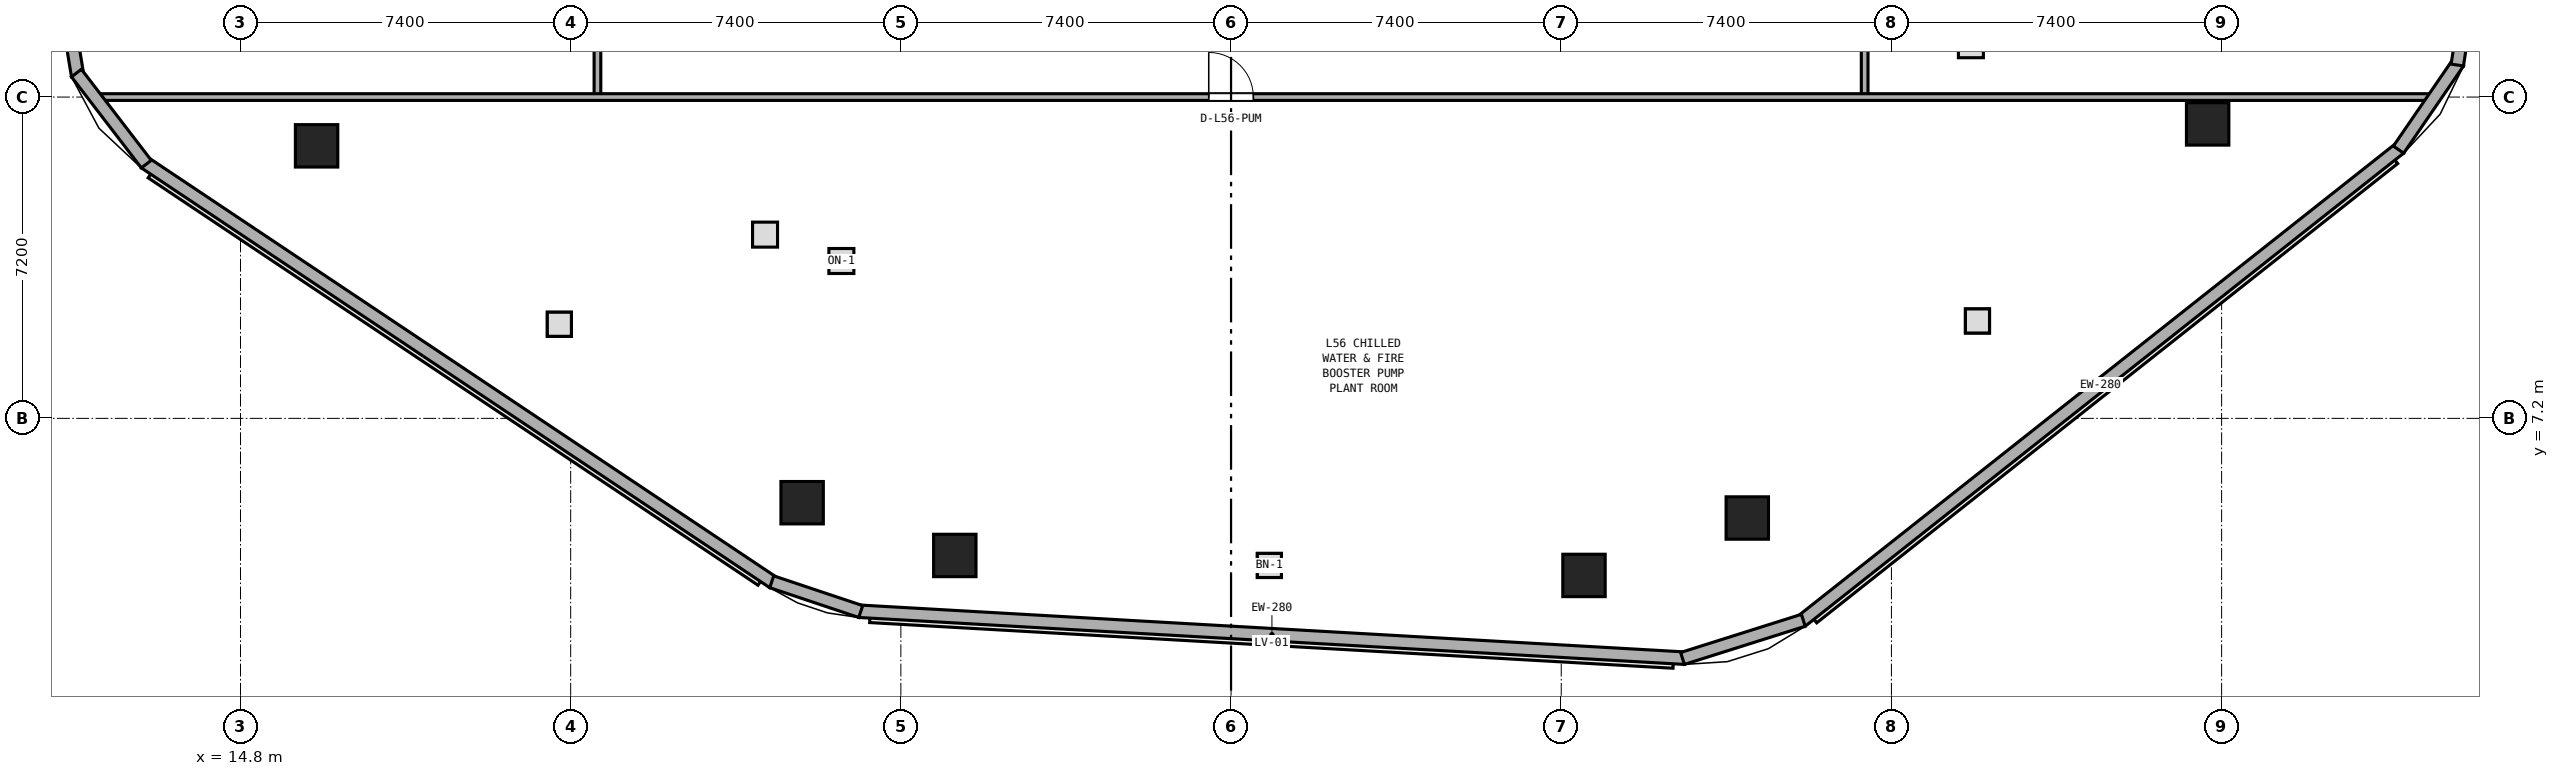
"""IFC4 building model, lengths in metres.
Left out: names, types, materials, properties, quantities, classifications, styles, units other than length and angle.
Written with IfcOpenShell. Run it as: python <this file> out.ifc"""

import sys

from ifc_helpers import new_model, si_unit, direction, frame, frame_2d, origin, origin_2d, place, context, subcontext, project, spatial, rectangle, extrude, element, fill, save


model = new_model("IFC4")
c1 = context("Model", 3, precision=1e-05, world=origin(), true_north=direction((0.0, 1.0)))
c2 = subcontext(c1, "Body", "Model", "MODEL_VIEW")
j1 = project(units=[si_unit("LENGTHUNIT", "METRE"), si_unit("PLANEANGLEUNIT", "RADIAN")], contexts=[c1])
p1 = place(None, origin())
s1 = spatial("IfcSite", under=j1, at=p1, CompositionType="ELEMENT")
p2 = place(p1, origin())
s2 = spatial("IfcBuilding", under=s1, at=p2, CompositionType="ELEMENT")
p3 = place(p2, frame((0.0, 0.0, 220.0)))
s3 = spatial("IfcBuildingStorey", under=s2, at=p3, CompositionType="ELEMENT", Elevation=220.0)
for number, where, z_axis, x_axis in (
    (1, (30.809, 4.127, 0.0), (0.0, 0.0, 1.0), (1.0, 0.0, 0.0)),
    (2, (44.91, 3.68, 0.0), (0.0, 0.0, 1.0), (1.0, 0.0, 0.0)),
    (3, (48.57, 4.967, 0.0), (0.0, 0.0, 1.0), (1.0, 0.0, 0.0)),
    (4, (58.887, 13.798, 0.0), (0.0, 0.0, 1.0), (1.0, 0.0, 0.0)),
    (5, (16.505, 13.307, 0.0), (0.0, 0.0, 1.0), (1.0, 0.0, 0.0)),
    (6, (27.387, 5.31, 0.0), (0.0, 0.0, 1.0), (1.0, 0.0, 0.0)),
):
    element("IfcColumn", number, at=place(p3, frame(where, z_axis=z_axis, x_axis=x_axis)), inside=s3, PredefinedType="COLUMN", context=c2, shape_type="SweptSolid", body=[
        extrude(rectangle(XDim=0.95, YDim=0.95, at=origin_2d()), origin(), (0.0, 0.0, 1.0), 5.0),
    ])
p4 = place(p3, frame((51.2, 14.4, 0.0), z_axis=(0.0, 0.0, 1.0), x_axis=(0.0, 1.0, 0.0)))
e7 = element("IfcWall", 7, at=p4, inside=s3, PredefinedType="PARTITIONING", context=c2, shape_type="SweptSolid", body=[
    extrude(rectangle(XDim=21.6, YDim=0.15, at=frame_2d((10.8, 0.0))), origin(), (0.0, 0.0, 1.0), 4.71),
])
p5 = place(p4, frame((10.2, 0.0, 0.0)))
e8 = element("IfcOpeningElement", 8, at=p5, cuts=e7, PredefinedType="OPENING", context=c2, shape_type="SweptSolid", body=[
    extrude(rectangle(XDim=1.2, YDim=2.15, at=frame_2d((0.6, 1.075))), frame((0.0, 0.085, 0.0), z_axis=(0.0, -1.0, 0.0), x_axis=(1.0, 0.0, 0.0)), (0.0, 0.0, 1.0), 0.17),
])
p6 = place(p3, frame((22.8, 14.4, 0.0), z_axis=(0.0, 0.0, 1.0), x_axis=(0.0, 1.0, 0.0)))
e9 = element("IfcWall", 9, at=p6, inside=s3, PredefinedType="PARTITIONING", context=c2, shape_type="SweptSolid", body=[
    extrude(rectangle(XDim=21.6, YDim=0.15, at=frame_2d((10.8, 0.0))), origin(), (0.0, 0.0, 1.0), 4.71),
])
p7 = place(p6, frame((10.3, 0.0, 0.0)))
e10 = element("IfcOpeningElement", 10, at=p7, cuts=e9, PredefinedType="OPENING", context=c2, shape_type="SweptSolid", body=[
    extrude(rectangle(XDim=1.0, YDim=2.04, at=frame_2d((0.5, 1.02))), frame((0.0, 0.085, 0.0), z_axis=(0.0, -1.0, 0.0), x_axis=(1.0, 0.0, 0.0)), (0.0, 0.0, 1.0), 0.17),
])
p8 = place(p3, frame((11.459, 14.4, 0.0), z_axis=(0.0, 0.0, 1.0), x_axis=(1.0, 0.0, 0.0)))
e11 = element("IfcWall", 11, at=p8, inside=s3, PredefinedType="PARTITIONING", context=c2, shape_type="SweptSolid", body=[
    extrude(rectangle(XDim=52.619, YDim=0.15, at=frame_2d((26.31, 0.0))), origin(), (0.0, 0.0, 1.0), 2.31),
])
p9 = place(p8, frame((25.041, 0.0, 0.0)))
e12 = element("IfcOpeningElement", 12, at=p9, cuts=e11, PredefinedType="OPENING", context=c2, shape_type="SweptSolid", body=[
    extrude(rectangle(XDim=1.0, YDim=2.04, at=frame_2d((0.5, 1.02))), frame((0.0, 0.085, 0.0), z_axis=(0.0, -1.0, 0.0), x_axis=(1.0, 0.0, 0.0)), (0.0, 0.0, 1.0), 0.17),
])
p10 = place(p3, frame((28.664, 2.878, 0.0), z_axis=(0.0, 0.0, 1.0), x_axis=(0.998387734977, -0.056762052882, 0.0)))
e13 = element("IfcWall", 13, at=p10, inside=s3, PredefinedType="STANDARD", context=c2, shape_type="SweptSolid", body=[
    extrude(rectangle(XDim=18.533, YDim=0.28, at=frame_2d((9.267, 0.0))), origin(), (0.0, 0.0, 1.0), 4.71),
])
p11 = place(p3, frame((49.781, 2.651, 0.0), z_axis=(0.0, 0.0, 1.0), x_axis=(0.784540146287, 0.620078026433, 0.0)))
e14 = element("IfcWall", 14, at=p11, inside=s3, PredefinedType="STANDARD", context=c2, shape_type="SweptSolid", body=[
    extrude(rectangle(XDim=17.097, YDim=0.28, at=frame_2d((8.548, 0.0))), origin(), (0.0, 0.0, 1.0), 2.31),
])
p12 = place(p3, frame((12.656, 12.929, 0.0), z_axis=(0.0, 0.0, 1.0), x_axis=(0.83155985002, -0.555435158983, 0.0)))
e15 = element("IfcWall", 15, at=p12, inside=s3, PredefinedType="STANDARD", context=c2, shape_type="SweptSolid", body=[
    extrude(rectangle(XDim=16.936, YDim=0.28, at=frame_2d((8.468, 0.0))), origin(), (0.0, 0.0, 1.0), 4.71),
])
p13 = place(p3, frame((47.118, 1.82, 0.0), z_axis=(0.0, 0.0, 1.0), x_axis=(0.953528067258, 0.301304206662, 0.0)))
e16 = element("IfcWall", 16, at=p13, inside=s3, PredefinedType="STANDARD", context=c2, shape_type="SweptSolid", body=[
    extrude(rectangle(XDim=2.839, YDim=0.28, at=frame_2d((1.419, 0.0))), origin(), (0.0, 0.0, 1.0), 4.71),
])
p14 = place(p3, frame((63.165, 13.222, 0.0), z_axis=(0.0, 0.0, 1.0), x_axis=(0.565732602928, 0.824588759313, 0.0)))
e17 = element("IfcWall", 17, at=p14, inside=s3, PredefinedType="STANDARD", context=c2, shape_type="SweptSolid", body=[
    extrude(rectangle(XDim=2.369, YDim=0.28, at=frame_2d((1.185, 0.0))), origin(), (0.0, 0.0, 1.0), 2.31),
])
p15 = place(p3, frame((64.482, 15.117, 0.0), z_axis=(0.0, 0.0, 1.0), x_axis=(0.149775197129, 0.988720076829, 0.0)))
e18 = element("IfcWall", 18, at=p15, inside=s3, PredefinedType="STANDARD", context=c2, shape_type="SweptSolid", body=[
    extrude(rectangle(XDim=1.198, YDim=0.28, at=frame_2d((0.599, 0.0))), origin(), (0.0, 0.0, 1.0), 2.31),
])
p16 = place(p3, frame((10.938, 16.161, 0.0), z_axis=(0.0, 0.0, 1.0), x_axis=(0.162940994575, -0.986635815429, 0.0)))
e19 = element("IfcWall", 19, at=p16, inside=s3, PredefinedType="STANDARD", context=c2, shape_type="SweptSolid", body=[
    extrude(rectangle(XDim=1.303, YDim=0.28, at=frame_2d((0.652, 0.0))), origin(), (0.0, 0.0, 1.0), 4.71),
])
p17 = place(p3, frame((11.124, 14.938, 0.0), z_axis=(0.0, 0.0, 1.0), x_axis=(0.608847960063, -0.79328693518, 0.0)))
e20 = element("IfcWall", 20, at=p17, inside=s3, PredefinedType="STANDARD", context=c2, shape_type="SweptSolid", body=[
    extrude(rectangle(XDim=2.572, YDim=0.28, at=frame_2d((1.286, 0.0))), origin(), (0.0, 0.0, 1.0), 4.71),
])
p18 = place(p3, frame((26.706, 3.538, 0.0), z_axis=(0.0, 0.0, 1.0), x_axis=(0.9483461383, -0.317237453608, 0.0)))
e21 = element("IfcWall", 21, at=p18, inside=s3, PredefinedType="STANDARD", context=c2, shape_type="SweptSolid", body=[
    extrude(rectangle(XDim=2.103, YDim=0.28, at=frame_2d((1.052, 0.0))), origin(), (0.0, 0.0, 1.0), 4.71),
])
p19 = place(p9, origin())
e22 = element("IfcDoor", 22, at=p19, inside=s3, OperationType="SINGLE_SWING_LEFT", PredefinedType="DOOR", context=c2, shape_type="SweptSolid", body=[
    extrude(rectangle(XDim=1.0, YDim=2.04, at=frame_2d((0.5, 1.02))), frame((0.0, 0.025, 0.0), z_axis=(0.0, -1.0, 0.0), x_axis=(1.0, 0.0, 0.0)), (0.0, 0.0, 1.0), 0.05),
])
fill(e12, e22)
save(model, sys.argv[1])
